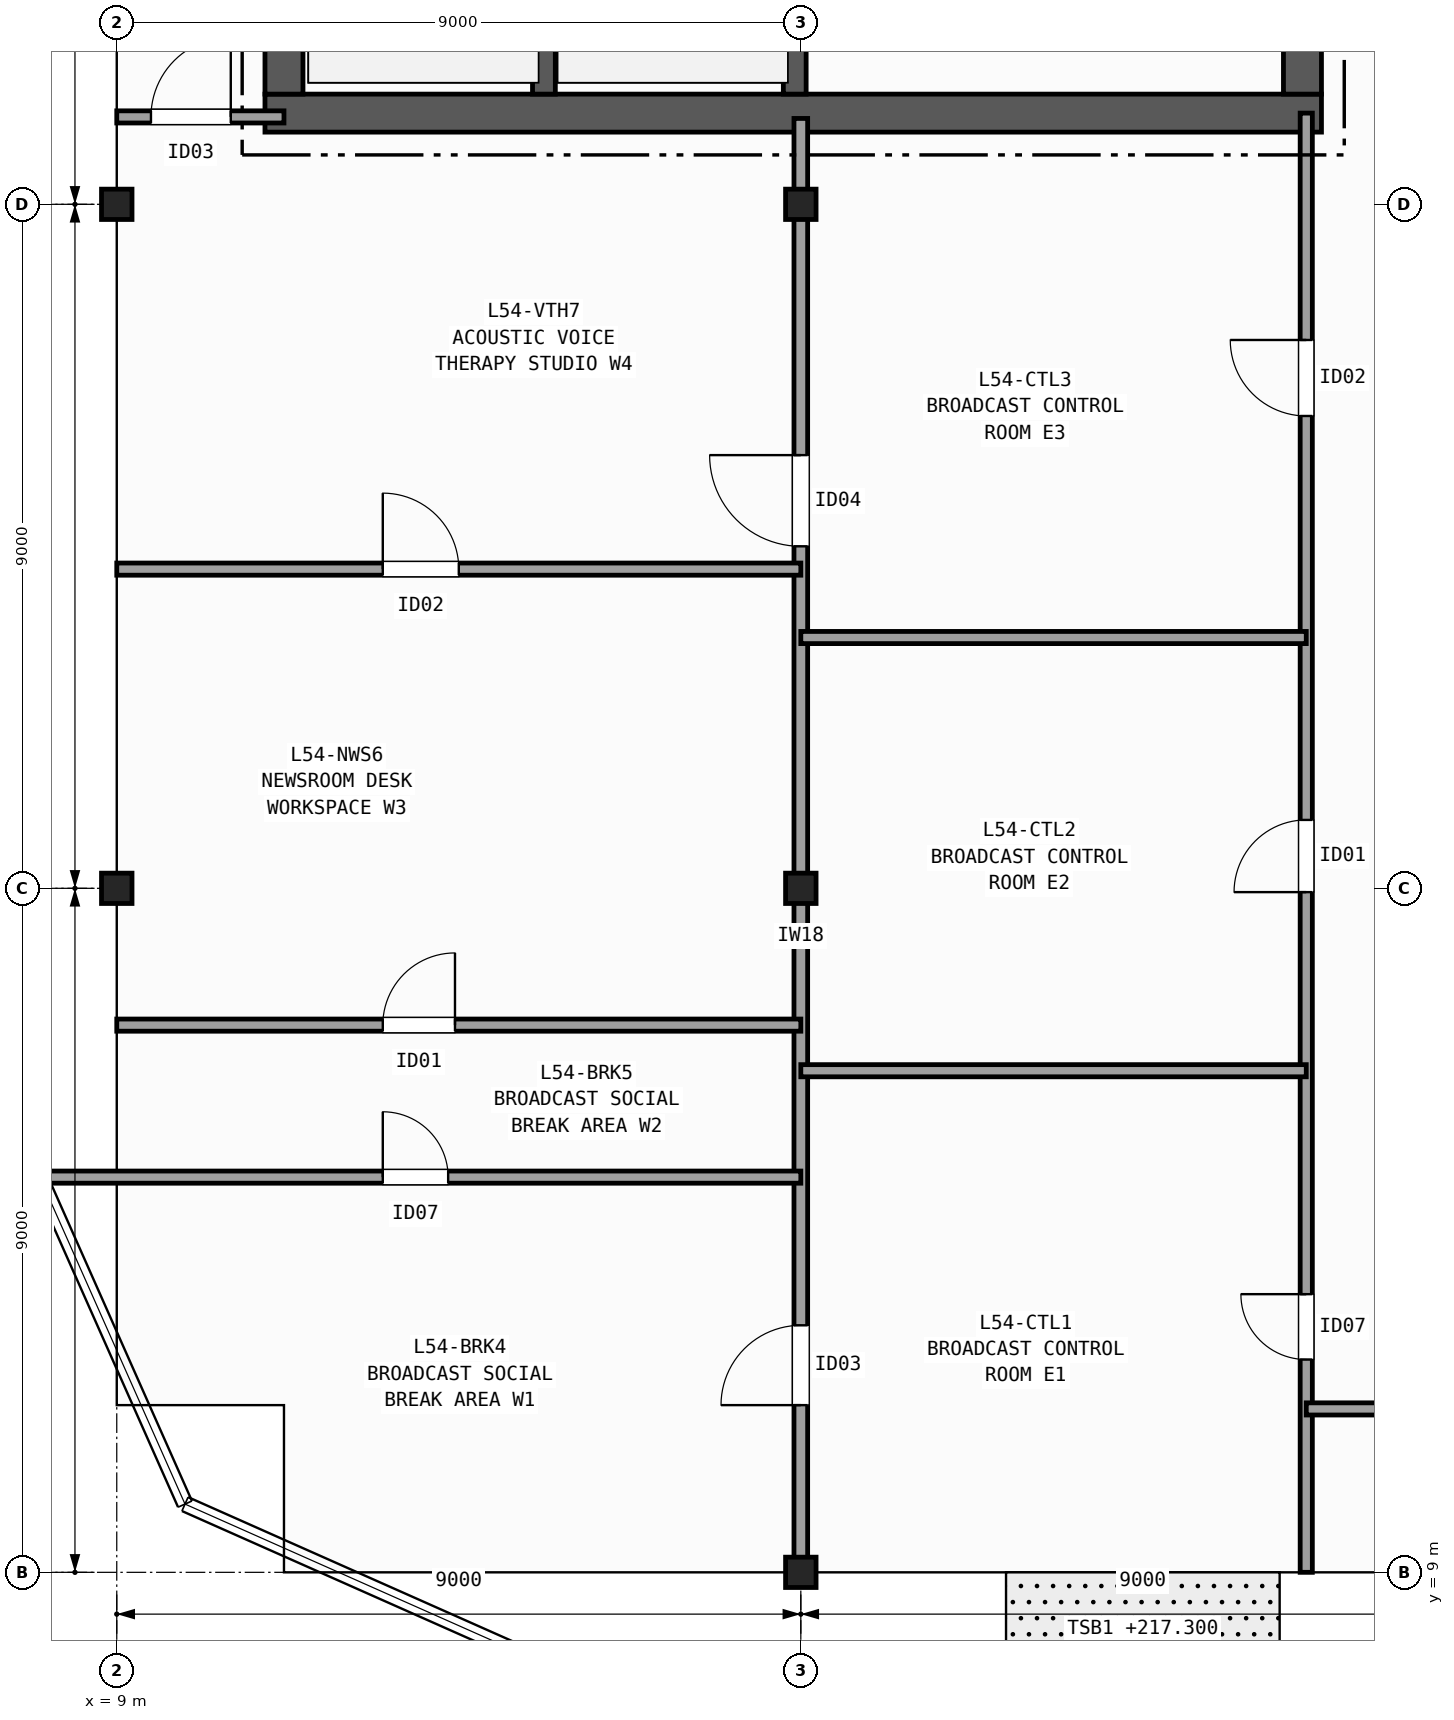
"""IFC4 building model, lengths in metres.
Left out: names, types, materials, properties, quantities, classifications, styles, units other than length and angle.
Written with IfcOpenShell. Run it as: python <this file> out.ifc"""

import sys

from ifc_helpers import new_model, si_unit, direction, frame, frame_2d, origin, origin_2d, place, context, subcontext, project, spatial, rectangle, i_section, extrude, element, fill, save


model = new_model("IFC4")
c1 = context("Model", 3, precision=1e-05, world=origin(), true_north=direction((0.0, 1.0)))
c2 = subcontext(c1, "Body", "Model", "MODEL_VIEW")
j1 = project(units=[si_unit("LENGTHUNIT", "METRE"), si_unit("PLANEANGLEUNIT", "RADIAN")], contexts=[c1])
p1 = place(None, origin())
s1 = spatial("IfcSite", under=j1, at=p1, CompositionType="ELEMENT")
p2 = place(p1, origin())
s2 = spatial("IfcBuilding", under=s1, at=p2, CompositionType="ELEMENT")
p3 = place(p2, frame((0.0, 0.0, 217.3)))
s3 = spatial("IfcBuildingStorey", under=s2, at=p3, CompositionType="ELEMENT", Elevation=217.3)
for number, where, z_axis, x_axis in (
    (1, (9.0, 18.0, 0.0), (0.0, 0.0, 1.0), (1.0, 0.0, 0.0)),
    (2, (9.0, 27.0, 0.0), (0.0, 0.0, 1.0), (1.0, 0.0, 0.0)),
    (3, (18.0, 9.0, 0.0), (0.0, 0.0, 1.0), (1.0, 0.0, 0.0)),
    (4, (18.0, 18.0, 0.0), (0.0, 0.0, 1.0), (1.0, 0.0, 0.0)),
    (5, (18.0, 27.0, 0.0), (0.0, 0.0, 1.0), (1.0, 0.0, 0.0)),
):
    element("IfcColumn", number, at=place(p3, frame(where, z_axis=z_axis, x_axis=x_axis)), inside=s3, PredefinedType="COLUMN", context=c2, shape_type="SweptSolid", body=[
        extrude(i_section(OverallWidth=0.401, OverallDepth=0.399, WebThickness=0.025, FlangeThickness=0.04, FilletRadius=0.015, at=origin_2d()), origin(), (0.0, 0.0, 1.0), 3.7),
    ])
p4 = place(p3, frame((10.95, 28.2, 0.0), z_axis=(0.0, 0.0, 1.0), x_axis=(1.0, 0.0, 0.0)))
e6 = element("IfcWall", 6, at=p4, inside=s3, PredefinedType="SHEAR", context=c2, shape_type="SweptSolid", body=[
    extrude(rectangle(XDim=13.9, YDim=0.5, at=frame_2d((6.95, 0.0))), origin(), (0.0, 0.0, 1.0), 3.42),
])
p5 = place(p3, frame((11.2, 42.15, 0.0), z_axis=(0.0, 0.0, 1.0), x_axis=(0.0, -1.0, 0.0)))
e7 = element("IfcWall", 7, at=p5, inside=s3, PredefinedType="SHEAR", context=c2, shape_type="SweptSolid", body=[
    extrude(rectangle(XDim=13.7, YDim=0.5, at=frame_2d((6.85, 0.0))), origin(), (0.0, 0.0, 1.0), 3.42),
])
p6 = place(p3, frame((24.6, 28.45, 0.0), z_axis=(0.0, 0.0, 1.0), x_axis=(0.0, 1.0, 0.0)))
e8 = element("IfcWall", 8, at=p6, inside=s3, PredefinedType="SHEAR", context=c2, shape_type="SweptSolid", body=[
    extrude(rectangle(XDim=13.7, YDim=0.5, at=frame_2d((6.85, 0.0))), origin(), (0.0, 0.0, 1.0), 3.42),
])
p7 = place(p6, frame((3.35, 0.0, 0.0)))
e9 = element("IfcOpeningElement", 9, at=p7, cuts=e8, PredefinedType="OPENING", context=c2, shape_type="SweptSolid", body=[
    extrude(rectangle(XDim=1.5, YDim=2.2, at=frame_2d((0.75, 1.1))), frame((0.0, 0.26, 0.0), z_axis=(0.0, -1.0, 0.0), x_axis=(1.0, 0.0, 0.0)), (0.0, 0.0, 1.0), 0.52),
])
p8 = place(p6, frame((9.95, 0.0, 0.0)))
e10 = element("IfcOpeningElement", 10, at=p8, cuts=e8, PredefinedType="OPENING", context=c2, shape_type="SweptSolid", body=[
    extrude(rectangle(XDim=0.9, YDim=2.1, at=frame_2d((0.45, 1.05))), frame((0.0, 0.26, 0.0), z_axis=(0.0, -1.0, 0.0), x_axis=(1.0, 0.0, 0.0)), (0.0, 0.0, 1.0), 0.52),
])
p9 = place(p6, frame((12.05, 0.0, 0.0)))
e11 = element("IfcOpeningElement", 11, at=p9, cuts=e8, PredefinedType="OPENING", context=c2, shape_type="SweptSolid", body=[
    extrude(rectangle(XDim=0.9, YDim=2.1, at=frame_2d((0.45, 1.05))), frame((0.0, 0.26, 0.0), z_axis=(0.0, -1.0, 0.0), x_axis=(1.0, 0.0, 0.0)), (0.0, 0.0, 1.0), 0.52),
])
p10 = place(p3, frame((14.62, 28.45, 0.0), z_axis=(0.0, 0.0, 1.0), x_axis=(0.0, 1.0, 0.0)))
e12 = element("IfcWall", 12, at=p10, inside=s3, PredefinedType="SHEAR", context=c2, shape_type="SweptSolid", body=[
    extrude(rectangle(XDim=9.0, YDim=0.3, at=frame_2d((4.5, 0.0))), origin(), (0.0, 0.0, 1.0), 3.42),
])
p11 = place(p3, frame((17.92, 42.15, 0.0), z_axis=(0.0, 0.0, 1.0), x_axis=(0.0, -1.0, 0.0)))
e13 = element("IfcWall", 13, at=p11, inside=s3, PredefinedType="SHEAR", context=c2, shape_type="SweptSolid", body=[
    extrude(rectangle(XDim=13.7, YDim=0.3, at=frame_2d((6.85, 0.0))), origin(), (0.0, 0.0, 1.0), 3.42),
])
p12 = place(p11, frame((1.975, 0.0, 0.0)))
e14 = element("IfcOpeningElement", 14, at=p12, cuts=e13, PredefinedType="OPENING", context=c2, shape_type="SweptSolid", body=[
    extrude(rectangle(XDim=1.15, YDim=2.15, at=frame_2d((0.575, 1.075))), frame((0.0, 0.16, 0.0), z_axis=(0.0, -1.0, 0.0), x_axis=(1.0, 0.0, 0.0)), (0.0, 0.0, 1.0), 0.32),
])
p13 = place(p3, frame((9.0, 28.15, 0.0), z_axis=(0.0, 0.0, 1.0), x_axis=(1.0, 0.0, 0.0)))
e15 = element("IfcWall", 15, at=p13, inside=s3, PredefinedType="PARTITIONING", context=c2, shape_type="SweptSolid", body=[
    extrude(rectangle(XDim=2.2, YDim=0.16, at=frame_2d((1.1, 0.0))), origin(), (0.0, 0.0, 1.0), 2.707),
])
p14 = place(p13, frame((0.45, 0.0, 0.0)))
e16 = element("IfcOpeningElement", 16, at=p14, cuts=e15, PredefinedType="OPENING", context=c2, shape_type="SweptSolid", body=[
    extrude(rectangle(XDim=1.05, YDim=2.15, at=frame_2d((0.525, 1.075))), frame((0.0, 0.09, 0.0), z_axis=(0.0, -1.0, 0.0), x_axis=(1.0, 0.0, 0.0)), (0.0, 0.0, 1.0), 0.18),
])
p15 = place(p3, frame((24.65, 9.0, 0.0), z_axis=(0.0, 0.0, 1.0), x_axis=(0.0, 1.0, 0.0)))
e17 = element("IfcWall", 17, at=p15, inside=s3, PredefinedType="PARTITIONING", context=c2, shape_type="SweptSolid", body=[
    extrude(rectangle(XDim=19.2, YDim=0.16, at=frame_2d((9.6, 0.0))), origin(), (0.0, 0.0, 1.0), 2.707),
])
p16 = place(p15, frame((2.8, 0.0, 0.0)))
e18 = element("IfcOpeningElement", 18, at=p16, cuts=e17, PredefinedType="OPENING", context=c2, shape_type="SweptSolid", body=[
    extrude(rectangle(XDim=0.86, YDim=2.05, at=frame_2d((0.43, 1.025))), frame((0.0, 0.09, 0.0), z_axis=(0.0, -1.0, 0.0), x_axis=(1.0, 0.0, 0.0)), (0.0, 0.0, 1.0), 0.18),
])
p17 = place(p15, frame((8.95, 0.0, 0.0)))
e19 = element("IfcOpeningElement", 19, at=p17, cuts=e17, PredefinedType="OPENING", context=c2, shape_type="SweptSolid", body=[
    extrude(rectangle(XDim=0.95, YDim=2.1, at=frame_2d((0.475, 1.05))), frame((0.0, 0.09, 0.0), z_axis=(0.0, -1.0, 0.0), x_axis=(1.0, 0.0, 0.0)), (0.0, 0.0, 1.0), 0.18),
])
p18 = place(p15, frame((15.215, 0.0, 0.0)))
e20 = element("IfcOpeningElement", 20, at=p18, cuts=e17, PredefinedType="OPENING", context=c2, shape_type="SweptSolid", body=[
    extrude(rectangle(XDim=1.0, YDim=2.1, at=frame_2d((0.5, 1.05))), frame((0.0, 0.09, 0.0), z_axis=(0.0, -1.0, 0.0), x_axis=(1.0, 0.0, 0.0)), (0.0, 0.0, 1.0), 0.18),
])
p19 = place(p3, frame((18.0, 9.0, 0.0), z_axis=(0.0, 0.0, 1.0), x_axis=(0.0, 1.0, 0.0)))
e21 = element("IfcWall", 21, at=p19, inside=s3, PredefinedType="PARTITIONING", context=c2, shape_type="SweptSolid", body=[
    extrude(rectangle(XDim=19.13, YDim=0.18, at=frame_2d((9.565, 0.0))), origin(), (0.0, 0.0, 1.0), 2.707),
])
p20 = place(p19, frame((2.2, 0.0, 0.0)))
e22 = element("IfcOpeningElement", 22, at=p20, cuts=e21, PredefinedType="OPENING", context=c2, shape_type="SweptSolid", body=[
    extrude(rectangle(XDim=1.05, YDim=2.15, at=frame_2d((0.525, 1.075))), frame((0.0, 0.1, 0.0), z_axis=(0.0, -1.0, 0.0), x_axis=(1.0, 0.0, 0.0)), (0.0, 0.0, 1.0), 0.2),
])
p21 = place(p19, frame((13.5, 0.0, 0.0)))
e23 = element("IfcOpeningElement", 23, at=p21, cuts=e21, PredefinedType="OPENING", context=c2, shape_type="SweptSolid", body=[
    extrude(rectangle(XDim=1.2, YDim=2.15, at=frame_2d((0.6, 1.075))), frame((0.0, 0.1, 0.0), z_axis=(0.0, -1.0, 0.0), x_axis=(1.0, 0.0, 0.0)), (0.0, 0.0, 1.0), 0.2),
])
p22 = place(p3, frame((18.0, 15.6, 0.0), z_axis=(0.0, 0.0, 1.0), x_axis=(1.0, 0.0, 0.0)))
e24 = element("IfcWall", 24, at=p22, inside=s3, PredefinedType="PARTITIONING", context=c2, shape_type="SweptSolid", body=[
    extrude(rectangle(XDim=6.65, YDim=0.16, at=frame_2d((3.325, 0.0))), origin(), (0.0, 0.0, 1.0), 2.789),
])
p23 = place(p3, frame((18.0, 21.3, 0.0), z_axis=(0.0, 0.0, 1.0), x_axis=(1.0, 0.0, 0.0)))
e25 = element("IfcWall", 25, at=p23, inside=s3, PredefinedType="PARTITIONING", context=c2, shape_type="SweptSolid", body=[
    extrude(rectangle(XDim=6.65, YDim=0.16, at=frame_2d((3.325, 0.0))), origin(), (0.0, 0.0, 1.0), 2.792),
])
p24 = place(p3, frame((7.987, 14.2, 0.0), z_axis=(0.0, 0.0, 1.0), x_axis=(1.0, 0.0, 0.0)))
e26 = element("IfcWall", 26, at=p24, inside=s3, PredefinedType="PARTITIONING", context=c2, shape_type="SweptSolid", body=[
    extrude(rectangle(XDim=10.013, YDim=0.16, at=frame_2d((5.006, 0.0))), origin(), (0.0, 0.0, 1.0), 2.792),
])
p25 = place(p24, frame((4.513, 0.0, 0.0)))
e27 = element("IfcOpeningElement", 27, at=p25, cuts=e26, PredefinedType="OPENING", context=c2, shape_type="SweptSolid", body=[
    extrude(rectangle(XDim=0.86, YDim=2.05, at=frame_2d((0.43, 1.025))), frame((0.0, 0.09, 0.0), z_axis=(0.0, -1.0, 0.0), x_axis=(1.0, 0.0, 0.0)), (0.0, 0.0, 1.0), 0.18),
])
p26 = place(p3, frame((9.0, 16.2, 0.0), z_axis=(0.0, 0.0, 1.0), x_axis=(1.0, 0.0, 0.0)))
e28 = element("IfcWall", 28, at=p26, inside=s3, PredefinedType="PARTITIONING", context=c2, shape_type="SweptSolid", body=[
    extrude(rectangle(XDim=9.0, YDim=0.16, at=frame_2d((4.5, 0.0))), origin(), (0.0, 0.0, 1.0), 2.792),
])
p27 = place(p26, frame((3.5, 0.0, 0.0)))
e29 = element("IfcOpeningElement", 29, at=p27, cuts=e28, PredefinedType="OPENING", context=c2, shape_type="SweptSolid", body=[
    extrude(rectangle(XDim=0.95, YDim=2.1, at=frame_2d((0.475, 1.05))), frame((0.0, 0.09, 0.0), z_axis=(0.0, -1.0, 0.0), x_axis=(1.0, 0.0, 0.0)), (0.0, 0.0, 1.0), 0.18),
])
p28 = place(p3, frame((9.0, 22.2, 0.0), z_axis=(0.0, 0.0, 1.0), x_axis=(1.0, 0.0, 0.0)))
e30 = element("IfcWall", 30, at=p28, inside=s3, PredefinedType="PARTITIONING", context=c2, shape_type="SweptSolid", body=[
    extrude(rectangle(XDim=9.0, YDim=0.16, at=frame_2d((4.5, 0.0))), origin(), (0.0, 0.0, 1.0), 2.707),
])
p29 = place(p28, frame((3.5, 0.0, 0.0)))
e31 = element("IfcOpeningElement", 31, at=p29, cuts=e30, PredefinedType="OPENING", context=c2, shape_type="SweptSolid", body=[
    extrude(rectangle(XDim=1.0, YDim=2.1, at=frame_2d((0.5, 1.05))), frame((0.0, 0.09, 0.0), z_axis=(0.0, -1.0, 0.0), x_axis=(1.0, 0.0, 0.0)), (0.0, 0.0, 1.0), 0.18),
])
p30 = place(p3, frame((24.65, 11.15, 0.0), z_axis=(0.0, 0.0, 1.0), x_axis=(1.0, 0.0, 0.0)))
e32 = element("IfcWall", 32, at=p30, inside=s3, PredefinedType="PARTITIONING", context=c2, shape_type="SweptSolid", body=[
    extrude(rectangle(XDim=4.75, YDim=0.16, at=frame_2d((2.375, 0.0))), origin(), (0.0, 0.0, 1.0), 2.792),
])
p31 = place(p30, frame((1.2, 0.0, 0.0)))
e33 = element("IfcOpeningElement", 33, at=p31, cuts=e32, PredefinedType="OPENING", context=c2, shape_type="SweptSolid", body=[
    extrude(rectangle(XDim=1.05, YDim=2.15, at=frame_2d((0.525, 1.075))), frame((0.0, 0.09, 0.0), z_axis=(0.0, -1.0, 0.0), x_axis=(1.0, 0.0, 0.0)), (0.0, 0.0, 1.0), 0.18),
])
p32 = place(p14, origin())
e34 = element("IfcDoor", 34, at=p32, inside=s3, OperationType="SINGLE_SWING_RIGHT", PredefinedType="DOOR", context=c2, shape_type="SweptSolid", body=[
    extrude(rectangle(XDim=1.05, YDim=2.15, at=frame_2d((0.525, 1.075))), frame((0.0, 0.025, 0.0), z_axis=(0.0, -1.0, 0.0), x_axis=(1.0, 0.0, 0.0)), (0.0, 0.0, 1.0), 0.05),
])
fill(e16, e34)
p33 = place(p16, origin())
e35 = element("IfcDoor", 35, at=p33, inside=s3, OperationType="SINGLE_SWING_RIGHT", PredefinedType="DOOR", context=c2, shape_type="SweptSolid", body=[
    extrude(rectangle(XDim=0.86, YDim=2.05, at=frame_2d((0.43, 1.025))), frame((0.0, 0.025, 0.0), z_axis=(0.0, -1.0, 0.0), x_axis=(1.0, 0.0, 0.0)), (0.0, 0.0, 1.0), 0.05),
])
fill(e18, e35)
p34 = place(p17, origin())
e36 = element("IfcDoor", 36, at=p34, inside=s3, OperationType="SINGLE_SWING_LEFT", PredefinedType="DOOR", context=c2, shape_type="SweptSolid", body=[
    extrude(rectangle(XDim=0.95, YDim=2.1, at=frame_2d((0.475, 1.05))), frame((0.0, 0.025, 0.0), z_axis=(0.0, -1.0, 0.0), x_axis=(1.0, 0.0, 0.0)), (0.0, 0.0, 1.0), 0.05),
])
fill(e19, e36)
p35 = place(p18, origin())
e37 = element("IfcDoor", 37, at=p35, inside=s3, OperationType="SINGLE_SWING_RIGHT", PredefinedType="DOOR", context=c2, shape_type="SweptSolid", body=[
    extrude(rectangle(XDim=1.0, YDim=2.1, at=frame_2d((0.5, 1.05))), frame((0.0, 0.025, 0.0), z_axis=(0.0, -1.0, 0.0), x_axis=(1.0, 0.0, 0.0)), (0.0, 0.0, 1.0), 0.05),
])
fill(e20, e37)
p36 = place(p20, origin())
e38 = element("IfcDoor", 38, at=p36, inside=s3, OperationType="SINGLE_SWING_LEFT", PredefinedType="DOOR", context=c2, shape_type="SweptSolid", body=[
    extrude(rectangle(XDim=1.05, YDim=2.15, at=frame_2d((0.525, 1.075))), frame((0.0, 0.025, 0.0), z_axis=(0.0, -1.0, 0.0), x_axis=(1.0, 0.0, 0.0)), (0.0, 0.0, 1.0), 0.05),
])
fill(e22, e38)
p37 = place(p21, origin())
e39 = element("IfcDoor", 39, at=p37, inside=s3, OperationType="SINGLE_SWING_RIGHT", PredefinedType="DOOR", context=c2, shape_type="SweptSolid", body=[
    extrude(rectangle(XDim=1.2, YDim=2.15, at=frame_2d((0.6, 1.075))), frame((0.0, 0.025, 0.0), z_axis=(0.0, -1.0, 0.0), x_axis=(1.0, 0.0, 0.0)), (0.0, 0.0, 1.0), 0.05),
])
fill(e23, e39)
p38 = place(p25, origin())
e40 = element("IfcDoor", 40, at=p38, inside=s3, OperationType="SINGLE_SWING_LEFT", PredefinedType="DOOR", context=c2, shape_type="SweptSolid", body=[
    extrude(rectangle(XDim=0.86, YDim=2.05, at=frame_2d((0.43, 1.025))), frame((0.0, 0.025, 0.0), z_axis=(0.0, -1.0, 0.0), x_axis=(1.0, 0.0, 0.0)), (0.0, 0.0, 1.0), 0.05),
])
fill(e27, e40)
p39 = place(p27, origin())
e41 = element("IfcDoor", 41, at=p39, inside=s3, OperationType="SINGLE_SWING_RIGHT", PredefinedType="DOOR", context=c2, shape_type="SweptSolid", body=[
    extrude(rectangle(XDim=0.95, YDim=2.1, at=frame_2d((0.475, 1.05))), frame((0.0, 0.025, 0.0), z_axis=(0.0, -1.0, 0.0), x_axis=(1.0, 0.0, 0.0)), (0.0, 0.0, 1.0), 0.05),
])
fill(e29, e41)
p40 = place(p29, origin())
e42 = element("IfcDoor", 42, at=p40, inside=s3, OperationType="SINGLE_SWING_LEFT", PredefinedType="DOOR", context=c2, shape_type="SweptSolid", body=[
    extrude(rectangle(XDim=1.0, YDim=2.1, at=frame_2d((0.5, 1.05))), frame((0.0, 0.025, 0.0), z_axis=(0.0, -1.0, 0.0), x_axis=(1.0, 0.0, 0.0)), (0.0, 0.0, 1.0), 0.05),
])
fill(e31, e42)
save(model, sys.argv[1])
